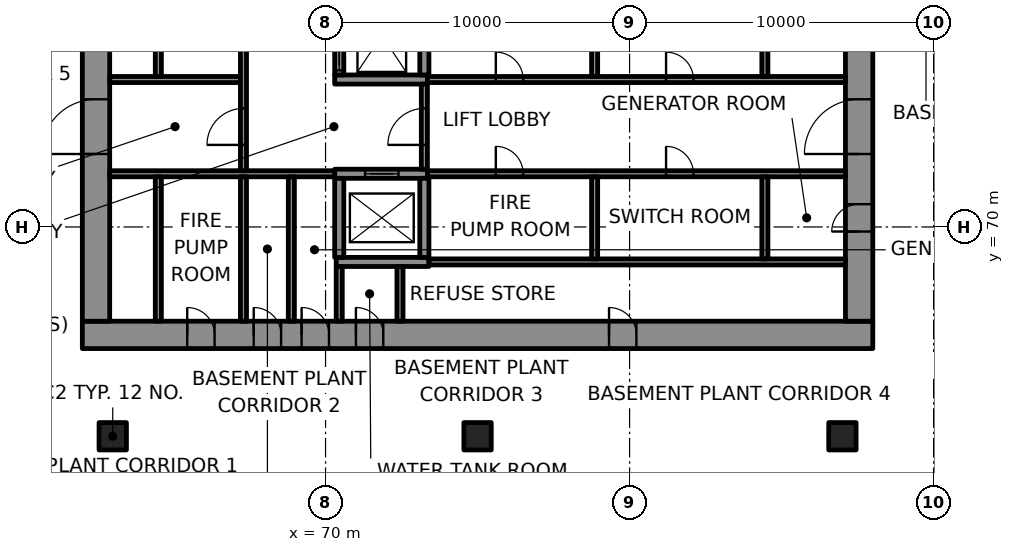
"""IFC4 building model, lengths in metres.
Left out: names, types, materials, properties, quantities, classifications, styles, units other than length and angle.
Written with IfcOpenShell. Run it as: python <this file> out.ifc"""

import sys

from ifc_helpers import new_model, si_unit, direction, frame, frame_2d, origin, origin_2d, place, context, subcontext, project, spatial, polyline, rectangle, outline, extrude, element, fill, save


model = new_model("IFC4")
c1 = context("Model", 3, precision=1e-05, world=origin(), true_north=direction((0.0, 1.0)))
c2 = subcontext(c1, "Body", "Model", "MODEL_VIEW")
j1 = project(units=[si_unit("LENGTHUNIT", "METRE"), si_unit("PLANEANGLEUNIT", "RADIAN")], contexts=[c1])
p1 = place(None, origin())
s1 = spatial("IfcSite", under=j1, at=p1, CompositionType="ELEMENT")
p2 = place(p1, origin())
s2 = spatial("IfcBuilding", under=s1, at=p2, CompositionType="ELEMENT")
p3 = place(p2, frame((0.0, 0.0, -14.0)))
s3 = spatial("IfcBuildingStorey", under=s2, at=p3, CompositionType="ELEMENT", Elevation=-14.0)
p4 = place(p3, frame((109.132, 57.451, -0.35), z_axis=(0.0, 0.0, 1.0), x_axis=(-0.499999206999, 0.866025861623, 0.0)))
e1 = element("IfcWall", 1, at=p4, inside=s3, PredefinedType="SOLIDWALL", context=c2, shape_type="SweptSolid", body=[
    extrude(rectangle(XDim=61.064, YDim=0.6, at=frame_2d((30.532, 0.0))), origin(), (0.0, 0.0, 1.0), 4.5),
])
p5 = place(p3, frame((67.936, 110.334, -0.35), z_axis=(0.0, 0.0, 1.0), x_axis=(-0.499999089162, -0.866025929656, 0.0)))
e2 = element("IfcWall", 2, at=p5, inside=s3, PredefinedType="SOLIDWALL", context=c2, shape_type="SweptSolid", body=[
    extrude(rectangle(XDim=53.501, YDim=0.6, at=frame_2d((26.751, 0.0))), origin(), (0.0, 0.0, 1.0), 4.5),
])
p6 = place(p3, frame((0.0, 0.0, -14.5)))
e3 = element("IfcWall", 3, at=p6, inside=s3, PredefinedType="SOLIDWALL", context=c2, shape_type="SweptSolid", body=[
    extrude(outline(polyline([(109.132, 57.451), (78.6, 110.334), (79.062, 111.134), (110.056, 57.451), (109.132, 57.451)])), origin(), (0.0, 0.0, 1.0), 14.15),
])
e4 = element("IfcWall", 4, at=p6, inside=s3, PredefinedType="SOLIDWALL", context=c2, shape_type="SweptSolid", body=[
    extrude(outline(polyline([(67.936, 110.334), (41.185, 64.0), (40.723, 64.8), (67.474, 111.134), (67.936, 110.334)])), origin(), (0.0, 0.0, 1.0), 14.15),
])
for number, where, z_axis, x_axis in (
    (5, (63.0, 63.115, -0.35), (0.0, 0.0, 1.0), (1.0, 0.0, 0.0)),
    (6, (75.0, 63.115, -0.35), (0.0, 0.0, 1.0), (1.0, 0.0, 0.0)),
    (7, (87.0, 63.115, -0.35), (0.0, 0.0, 1.0), (1.0, 0.0, 0.0)),
):
    element("IfcColumn", number, at=place(p3, frame(where, z_axis=z_axis, x_axis=x_axis)), inside=s3, PredefinedType="COLUMN", context=c2, shape_type="SweptSolid", body=[
        extrude(rectangle(XDim=0.9, YDim=0.9, at=origin_2d()), origin(), (0.0, 0.0, 1.0), 4.85),
    ])
p7 = place(p3, frame((62.0, 66.45, -0.35), z_axis=(0.0, 0.0, 1.0), x_axis=(1.0, 0.0, 0.0)))
e8 = element("IfcWall", 8, at=p7, inside=s3, PredefinedType="SHEAR", context=c2, shape_type="SweptSolid", body=[
    extrude(rectangle(XDim=26.0, YDim=0.9, at=frame_2d((13.0, 0.0))), origin(), (0.0, 0.0, 1.0), 4.5),
])
p8 = place(p7, frame((3.45, 0.0, 0.35)))
e9 = element("IfcOpeningElement", 9, at=p8, cuts=e8, PredefinedType="OPENING", context=c2, shape_type="SweptSolid", body=[
    extrude(rectangle(XDim=0.9, YDim=2.1, at=frame_2d((0.45, 1.05))), frame((0.0, 0.46, 0.0), z_axis=(0.0, -1.0, 0.0), x_axis=(1.0, 0.0, 0.0)), (0.0, 0.0, 1.0), 0.92),
])
p9 = place(p7, frame((5.637, 0.0, 0.35)))
e10 = element("IfcOpeningElement", 10, at=p9, cuts=e8, PredefinedType="OPENING", context=c2, shape_type="SweptSolid", body=[
    extrude(rectangle(XDim=0.9, YDim=2.1, at=frame_2d((0.45, 1.05))), frame((0.0, 0.46, 0.0), z_axis=(0.0, -1.0, 0.0), x_axis=(1.0, 0.0, 0.0)), (0.0, 0.0, 1.0), 0.92),
])
p10 = place(p7, frame((7.212, 0.0, 0.35)))
e11 = element("IfcOpeningElement", 11, at=p10, cuts=e8, PredefinedType="OPENING", context=c2, shape_type="SweptSolid", body=[
    extrude(rectangle(XDim=0.9, YDim=2.1, at=frame_2d((0.45, 1.05))), frame((0.0, 0.46, 0.0), z_axis=(0.0, -1.0, 0.0), x_axis=(1.0, 0.0, 0.0)), (0.0, 0.0, 1.0), 0.92),
])
p11 = place(p7, frame((8.999, 0.0, 0.35)))
e12 = element("IfcOpeningElement", 12, at=p11, cuts=e8, PredefinedType="OPENING", context=c2, shape_type="SweptSolid", body=[
    extrude(rectangle(XDim=0.9, YDim=2.1, at=frame_2d((0.45, 1.05))), frame((0.0, 0.46, 0.0), z_axis=(0.0, -1.0, 0.0), x_axis=(1.0, 0.0, 0.0)), (0.0, 0.0, 1.0), 0.92),
])
p12 = place(p7, frame((17.324, 0.0, 0.35)))
e13 = element("IfcOpeningElement", 13, at=p12, cuts=e8, PredefinedType="OPENING", context=c2, shape_type="SweptSolid", body=[
    extrude(rectangle(XDim=0.9, YDim=2.1, at=frame_2d((0.45, 1.05))), frame((0.0, 0.46, 0.0), z_axis=(0.0, -1.0, 0.0), x_axis=(1.0, 0.0, 0.0)), (0.0, 0.0, 1.0), 0.92),
])
p13 = place(p3, frame((62.45, 66.9, -0.35), z_axis=(0.0, 0.0, 1.0), x_axis=(0.0, 1.0, 0.0)))
e14 = element("IfcWall", 14, at=p13, inside=s3, PredefinedType="SHEAR", context=c2, shape_type="SweptSolid", body=[
    extrude(rectangle(XDim=16.2, YDim=0.9, at=frame_2d((8.1, 0.0))), origin(), (0.0, 0.0, 1.0), 4.5),
])
p14 = place(p13, frame((5.5, 0.0, 0.35)))
e15 = element("IfcOpeningElement", 15, at=p14, cuts=e14, PredefinedType="OPENING", context=c2, shape_type="SweptSolid", body=[
    extrude(rectangle(XDim=1.8, YDim=2.1, at=frame_2d((0.9, 1.05))), frame((0.0, 0.46, 0.0), z_axis=(0.0, -1.0, 0.0), x_axis=(1.0, 0.0, 0.0)), (0.0, 0.0, 1.0), 0.92),
])
p15 = place(p3, frame((87.55, 66.9, -0.35), z_axis=(0.0, 0.0, 1.0), x_axis=(0.0, 1.0, 0.0)))
e16 = element("IfcWall", 16, at=p15, inside=s3, PredefinedType="SHEAR", context=c2, shape_type="SweptSolid", body=[
    extrude(rectangle(XDim=16.2, YDim=0.9, at=frame_2d((8.1, 0.0))), origin(), (0.0, 0.0, 1.0), 4.5),
])
p16 = place(p15, frame((5.5, 0.0, 0.35)))
e17 = element("IfcOpeningElement", 17, at=p16, cuts=e16, PredefinedType="OPENING", context=c2, shape_type="SweptSolid", body=[
    extrude(rectangle(XDim=1.8, YDim=2.1, at=frame_2d((0.9, 1.05))), frame((0.0, 0.46, 0.0), z_axis=(0.0, -1.0, 0.0), x_axis=(1.0, 0.0, 0.0)), (0.0, 0.0, 1.0), 0.92),
])
p17 = place(p15, frame((2.95, 0.0, 0.35)))
e18 = element("IfcOpeningElement", 18, at=p17, cuts=e16, PredefinedType="OPENING", context=c2, shape_type="SweptSolid", body=[
    extrude(rectangle(XDim=0.9, YDim=2.1, at=frame_2d((0.45, 1.05))), frame((0.0, 0.46, 0.0), z_axis=(0.0, -1.0, 0.0), x_axis=(1.0, 0.0, 0.0)), (0.0, 0.0, 1.0), 0.92),
])
p18 = place(p15, frame((8.95, 0.0, 0.35)))
e19 = element("IfcOpeningElement", 19, at=p18, cuts=e16, PredefinedType="OPENING", context=c2, shape_type="SweptSolid", body=[
    extrude(rectangle(XDim=0.9, YDim=2.1, at=frame_2d((0.45, 1.05))), frame((0.0, 0.46, 0.0), z_axis=(0.0, -1.0, 0.0), x_axis=(1.0, 0.0, 0.0)), (0.0, 0.0, 1.0), 0.92),
])
p19 = place(p15, frame((11.202, 0.0, 0.35)))
e20 = element("IfcOpeningElement", 20, at=p19, cuts=e16, PredefinedType="OPENING", context=c2, shape_type="SweptSolid", body=[
    extrude(rectangle(XDim=0.9, YDim=2.1, at=frame_2d((0.45, 1.05))), frame((0.0, 0.46, 0.0), z_axis=(0.0, -1.0, 0.0), x_axis=(1.0, 0.0, 0.0)), (0.0, 0.0, 1.0), 0.92),
])
p20 = place(p3, frame((70.35, 68.85, -0.35), z_axis=(0.0, 0.0, 1.0), x_axis=(1.0, 0.0, 0.0)))
e21 = element("IfcWall", 21, at=p20, inside=s3, PredefinedType="SHEAR", context=c2, shape_type="SweptSolid", body=[
    extrude(rectangle(XDim=3.05, YDim=0.3, at=frame_2d((1.525, 0.0))), origin(), (0.0, 0.0, 1.0), 4.5),
])
p21 = place(p3, frame((70.3, 71.75, -0.35), z_axis=(0.0, 0.0, 1.0), x_axis=(1.0, 0.0, 0.0)))
e22 = element("IfcWall", 22, at=p21, inside=s3, PredefinedType="SHEAR", context=c2, shape_type="SweptSolid", body=[
    extrude(rectangle(XDim=3.05, YDim=0.3, at=frame_2d((1.525, 0.0))), origin(), (0.0, 0.0, 1.0), 4.5),
])
p22 = place(p21, frame((1.0, 0.0, 0.35)))
e23 = element("IfcOpeningElement", 23, at=p22, cuts=e22, PredefinedType="OPENING", context=c2, shape_type="SweptSolid", body=[
    extrude(rectangle(XDim=1.1, YDim=2.1, at=frame_2d((0.55, 1.05))), frame((0.0, 0.16, 0.0), z_axis=(0.0, -1.0, 0.0), x_axis=(1.0, 0.0, 0.0)), (0.0, 0.0, 1.0), 0.32),
])
p23 = place(p3, frame((70.3, 74.85, -0.35), z_axis=(0.0, 0.0, 1.0), x_axis=(1.0, 0.0, 0.0)))
e24 = element("IfcWall", 24, at=p23, inside=s3, PredefinedType="SHEAR", context=c2, shape_type="SweptSolid", body=[
    extrude(rectangle(XDim=3.05, YDim=0.3, at=frame_2d((1.525, 0.0))), origin(), (0.0, 0.0, 1.0), 4.5),
])
p24 = place(p3, frame((70.45, 69.0, -0.35), z_axis=(0.0, 0.0, 1.0), x_axis=(0.0, 1.0, 0.0)))
e25 = element("IfcWall", 25, at=p24, inside=s3, PredefinedType="SHEAR", context=c2, shape_type="SweptSolid", body=[
    extrude(rectangle(XDim=2.6, YDim=0.3, at=frame_2d((1.3, 0.0))), origin(), (0.0, 0.0, 1.0), 4.5),
])
p25 = place(p3, frame((70.45, 75.0, -0.35), z_axis=(0.0, 0.0, 1.0), x_axis=(0.0, 1.0, 0.0)))
e26 = element("IfcWall", 26, at=p25, inside=s3, PredefinedType="SHEAR", context=c2, shape_type="SweptSolid", body=[
    extrude(rectangle(XDim=2.6, YDim=0.3, at=frame_2d((1.3, 0.0))), origin(), (0.0, 0.0, 1.0), 4.5),
])
p26 = place(p25, frame((0.15, 0.0, 0.35)))
e27 = element("IfcOpeningElement", 27, at=p26, cuts=e26, PredefinedType="OPENING", context=c2, shape_type="SweptSolid", body=[
    extrude(rectangle(XDim=1.1, YDim=2.1, at=frame_2d((0.55, 1.05))), frame((0.0, 0.16, 0.0), z_axis=(0.0, -1.0, 0.0), x_axis=(1.0, 0.0, 0.0)), (0.0, 0.0, 1.0), 0.32),
])
for number, where, z_axis, x_axis in (
    (28, (73.25, 69.0, -0.35), (0.0, 0.0, 1.0), (0.0, 1.0, 0.0)),
    (29, (73.25, 75.0, -0.35), (0.0, 0.0, 1.0), (0.0, 1.0, 0.0)),
):
    element("IfcWall", number, at=place(p3, frame(where, z_axis=z_axis, x_axis=x_axis)), inside=s3, PredefinedType="SHEAR", context=c2, shape_type="SweptSolid", body=[
        extrude(rectangle(XDim=2.6, YDim=0.3, at=frame_2d((1.3, 0.0))), origin(), (0.0, 0.0, 1.0), 4.5),
    ])
p27 = place(p3, frame((73.4, 68.85, 0.0), z_axis=(0.0, 0.0, 1.0), x_axis=(1.0, 0.0, 0.0)))
e30 = element("IfcWall", 30, at=p27, inside=s3, PredefinedType="PARTITIONING", context=c2, shape_type="SweptSolid", body=[
    extrude(rectangle(XDim=13.7, YDim=0.2, at=frame_2d((6.85, 0.0))), origin(), (0.0, 0.0, 1.0), 4.15),
])
p28 = place(p3, frame((62.9, 71.75, 0.0), z_axis=(0.0, 0.0, 1.0), x_axis=(1.0, 0.0, 0.0)))
e31 = element("IfcWall", 31, at=p28, inside=s3, PredefinedType="PARTITIONING", context=c2, shape_type="SweptSolid", body=[
    extrude(rectangle(XDim=7.4, YDim=0.2, at=frame_2d((3.7, 0.0))), origin(), (0.0, 0.0, 1.0), 4.15),
])
p29 = place(p3, frame((73.35, 71.75, 0.0), z_axis=(0.0, 0.0, 1.0), x_axis=(1.0, 0.0, 0.0)))
e32 = element("IfcWall", 32, at=p29, inside=s3, PredefinedType="PARTITIONING", context=c2, shape_type="SweptSolid", body=[
    extrude(rectangle(XDim=13.75, YDim=0.2, at=frame_2d((6.875, 0.0))), origin(), (0.0, 0.0, 1.0), 4.15),
])
p30 = place(p29, frame((2.25, 0.0, 0.0)))
e33 = element("IfcOpeningElement", 33, at=p30, cuts=e32, PredefinedType="OPENING", context=c2, shape_type="SweptSolid", body=[
    extrude(rectangle(XDim=0.9, YDim=2.1, at=frame_2d((0.45, 1.05))), frame((0.0, 0.11, 0.0), z_axis=(0.0, -1.0, 0.0), x_axis=(1.0, 0.0, 0.0)), (0.0, 0.0, 1.0), 0.22),
])
p31 = place(p29, frame((7.85, 0.0, 0.0)))
e34 = element("IfcOpeningElement", 34, at=p31, cuts=e32, PredefinedType="OPENING", context=c2, shape_type="SweptSolid", body=[
    extrude(rectangle(XDim=0.9, YDim=2.1, at=frame_2d((0.45, 1.05))), frame((0.0, 0.11, 0.0), z_axis=(0.0, -1.0, 0.0), x_axis=(1.0, 0.0, 0.0)), (0.0, 0.0, 1.0), 0.22),
])
p32 = place(p3, frame((62.9, 74.85, 0.0), z_axis=(0.0, 0.0, 1.0), x_axis=(1.0, 0.0, 0.0)))
e35 = element("IfcWall", 35, at=p32, inside=s3, PredefinedType="PARTITIONING", context=c2, shape_type="SweptSolid", body=[
    extrude(rectangle(XDim=4.3, YDim=0.2, at=frame_2d((2.15, 0.0))), origin(), (0.0, 0.0, 1.0), 4.15),
])
p33 = place(p3, frame((73.35, 74.85, 0.0), z_axis=(0.0, 0.0, 1.0), x_axis=(1.0, 0.0, 0.0)))
e36 = element("IfcWall", 36, at=p33, inside=s3, PredefinedType="PARTITIONING", context=c2, shape_type="SweptSolid", body=[
    extrude(rectangle(XDim=13.75, YDim=0.2, at=frame_2d((6.875, 0.0))), origin(), (0.0, 0.0, 1.0), 4.15),
])
p34 = place(p33, frame((2.25, 0.0, 0.0)))
e37 = element("IfcOpeningElement", 37, at=p34, cuts=e36, PredefinedType="OPENING", context=c2, shape_type="SweptSolid", body=[
    extrude(rectangle(XDim=0.9, YDim=2.1, at=frame_2d((0.45, 1.05))), frame((0.0, 0.11, 0.0), z_axis=(0.0, -1.0, 0.0), x_axis=(1.0, 0.0, 0.0)), (0.0, 0.0, 1.0), 0.22),
])
p35 = place(p33, frame((7.85, 0.0, 0.0)))
e38 = element("IfcOpeningElement", 38, at=p35, cuts=e36, PredefinedType="OPENING", context=c2, shape_type="SweptSolid", body=[
    extrude(rectangle(XDim=0.9, YDim=2.1, at=frame_2d((0.45, 1.05))), frame((0.0, 0.11, 0.0), z_axis=(0.0, -1.0, 0.0), x_axis=(1.0, 0.0, 0.0)), (0.0, 0.0, 1.0), 0.22),
])
p36 = place(p3, frame((64.5, 66.9, 0.0), z_axis=(0.0, 0.0, 1.0), x_axis=(0.0, 1.0, 0.0)))
e39 = element("IfcWall", 39, at=p36, inside=s3, PredefinedType="PARTITIONING", context=c2, shape_type="SweptSolid", body=[
    extrude(rectangle(XDim=4.75, YDim=0.2, at=frame_2d((2.375, 0.0))), origin(), (0.0, 0.0, 1.0), 4.15),
])
p37 = place(p3, frame((64.5, 74.95, 0.0), z_axis=(0.0, 0.0, 1.0), x_axis=(0.0, 1.0, 0.0)))
e40 = element("IfcWall", 40, at=p37, inside=s3, PredefinedType="PARTITIONING", context=c2, shape_type="SweptSolid", body=[
    extrude(rectangle(XDim=8.15, YDim=0.2, at=frame_2d((4.075, 0.0))), origin(), (0.0, 0.0, 1.0), 4.15),
])
p38 = place(p3, frame((67.3, 66.9, 0.0), z_axis=(0.0, 0.0, 1.0), x_axis=(0.0, 1.0, 0.0)))
e41 = element("IfcWall", 41, at=p38, inside=s3, PredefinedType="PARTITIONING", context=c2, shape_type="SweptSolid", body=[
    extrude(rectangle(XDim=4.75, YDim=0.2, at=frame_2d((2.375, 0.0))), origin(), (0.0, 0.0, 1.0), 4.15),
])
p39 = place(p3, frame((67.3, 71.85, 0.0), z_axis=(0.0, 0.0, 1.0), x_axis=(0.0, 1.0, 0.0)))
e42 = element("IfcWall", 42, at=p39, inside=s3, PredefinedType="PARTITIONING", context=c2, shape_type="SweptSolid", body=[
    extrude(rectangle(XDim=5.75, YDim=0.2, at=frame_2d((2.875, 0.0))), origin(), (0.0, 0.0, 1.0), 4.15),
])
p40 = place(p39, frame((0.85, 0.0, 0.0)))
e43 = element("IfcOpeningElement", 43, at=p40, cuts=e42, PredefinedType="OPENING", context=c2, shape_type="SweptSolid", body=[
    extrude(rectangle(XDim=1.2, YDim=2.1, at=frame_2d((0.6, 1.05))), frame((0.0, 0.11, 0.0), z_axis=(0.0, -1.0, 0.0), x_axis=(1.0, 0.0, 0.0)), (0.0, 0.0, 1.0), 0.22),
])
p41 = place(p3, frame((68.875, 66.9, 0.0), z_axis=(0.0, 0.0, 1.0), x_axis=(0.0, 1.0, 0.0)))
e44 = element("IfcWall", 44, at=p41, inside=s3, PredefinedType="PARTITIONING", context=c2, shape_type="SweptSolid", body=[
    extrude(rectangle(XDim=4.75, YDim=0.2, at=frame_2d((2.375, 0.0))), origin(), (0.0, 0.0, 1.0), 4.15),
])
for number, where, z_axis, x_axis in (
    (45, (70.45, 66.9, 0.0), (0.0, 0.0, 1.0), (0.0, 1.0, 0.0)),
    (46, (72.448, 66.9, 0.0), (0.0, 0.0, 1.0), (0.0, 1.0, 0.0)),
):
    element("IfcWall", number, at=place(p3, frame(where, z_axis=z_axis, x_axis=x_axis)), inside=s3, PredefinedType="PARTITIONING", context=c2, shape_type="SweptSolid", body=[
        extrude(rectangle(XDim=1.8, YDim=0.2, at=frame_2d((0.9, 0.0))), origin(), (0.0, 0.0, 1.0), 4.15),
    ])
p42 = place(p3, frame((73.25, 71.9, 0.0), z_axis=(0.0, 0.0, 1.0), x_axis=(0.0, 1.0, 0.0)))
e47 = element("IfcWall", 47, at=p42, inside=s3, PredefinedType="PARTITIONING", context=c2, shape_type="SweptSolid", body=[
    extrude(rectangle(XDim=2.8, YDim=0.2, at=frame_2d((1.4, 0.0))), origin(), (0.0, 0.0, 1.0), 4.15),
])
p43 = place(p42, frame((0.8, 0.0, 0.0)))
e48 = element("IfcOpeningElement", 48, at=p43, cuts=e47, PredefinedType="OPENING", context=c2, shape_type="SweptSolid", body=[
    extrude(rectangle(XDim=1.2, YDim=2.1, at=frame_2d((0.6, 1.05))), frame((0.0, 0.11, 0.0), z_axis=(0.0, -1.0, 0.0), x_axis=(1.0, 0.0, 0.0)), (0.0, 0.0, 1.0), 0.22),
])
p44 = place(p3, frame((78.85, 68.95, 0.0), z_axis=(0.0, 0.0, 1.0), x_axis=(0.0, 1.0, 0.0)))
e49 = element("IfcWall", 49, at=p44, inside=s3, PredefinedType="PARTITIONING", context=c2, shape_type="SweptSolid", body=[
    extrude(rectangle(XDim=2.7, YDim=0.2, at=frame_2d((1.35, 0.0))), origin(), (0.0, 0.0, 1.0), 4.15),
])
p45 = place(p3, frame((78.85, 74.95, 0.0), z_axis=(0.0, 0.0, 1.0), x_axis=(0.0, 1.0, 0.0)))
e50 = element("IfcWall", 50, at=p45, inside=s3, PredefinedType="PARTITIONING", context=c2, shape_type="SweptSolid", body=[
    extrude(rectangle(XDim=2.65, YDim=0.2, at=frame_2d((1.325, 0.0))), origin(), (0.0, 0.0, 1.0), 4.15),
])
for number, where, z_axis, x_axis in (
    (51, (84.45, 68.95, 0.0), (0.0, 0.0, 1.0), (0.0, 1.0, 0.0)),
    (52, (84.45, 74.95, 0.0), (0.0, 0.0, 1.0), (0.0, 1.0, 0.0)),
):
    element("IfcWall", number, at=place(p3, frame(where, z_axis=z_axis, x_axis=x_axis)), inside=s3, PredefinedType="PARTITIONING", context=c2, shape_type="SweptSolid", body=[
        extrude(rectangle(XDim=2.7, YDim=0.2, at=frame_2d((1.35, 0.0))), origin(), (0.0, 0.0, 1.0), 4.15),
    ])
p46 = place(p22, origin())
e53 = element("IfcDoor", 53, at=p46, inside=s3, OperationType="DOUBLE_DOOR_SLIDING", PredefinedType="DOOR", context=c2, shape_type="SweptSolid", body=[
    extrude(rectangle(XDim=1.1, YDim=2.1, at=frame_2d((0.55, 1.05))), frame((0.0, 0.025, 0.0), z_axis=(0.0, -1.0, 0.0), x_axis=(1.0, 0.0, 0.0)), (0.0, 0.0, 1.0), 0.05),
])
fill(e23, e53)
p47 = place(p26, origin())
e54 = element("IfcDoor", 54, at=p47, inside=s3, OperationType="DOUBLE_DOOR_SLIDING", PredefinedType="DOOR", context=c2, shape_type="SweptSolid", body=[
    extrude(rectangle(XDim=1.1, YDim=2.1, at=frame_2d((0.55, 1.05))), frame((0.0, 0.025, 0.0), z_axis=(0.0, -1.0, 0.0), x_axis=(1.0, 0.0, 0.0)), (0.0, 0.0, 1.0), 0.05),
])
fill(e27, e54)
p48 = place(p43, origin())
e55 = element("IfcDoor", 55, at=p48, inside=s3, OperationType="SINGLE_SWING_LEFT", PredefinedType="DOOR", context=c2, shape_type="SweptSolid", body=[
    extrude(rectangle(XDim=1.2, YDim=2.1, at=frame_2d((0.6, 1.05))), frame((0.0, 0.025, 0.0), z_axis=(0.0, -1.0, 0.0), x_axis=(1.0, 0.0, 0.0)), (0.0, 0.0, 1.0), 0.05),
])
fill(e48, e55)
p49 = place(p40, origin())
e56 = element("IfcDoor", 56, at=p49, inside=s3, OperationType="SINGLE_SWING_RIGHT", PredefinedType="DOOR", context=c2, shape_type="SweptSolid", body=[
    extrude(rectangle(XDim=1.2, YDim=2.1, at=frame_2d((0.6, 1.05))), frame((0.0, 0.025, 0.0), z_axis=(0.0, -1.0, 0.0), x_axis=(1.0, 0.0, 0.0)), (0.0, 0.0, 1.0), 0.05),
])
fill(e43, e56)
p50 = place(p14, origin())
e57 = element("IfcDoor", 57, at=p50, inside=s3, OperationType="SINGLE_SWING_LEFT", PredefinedType="DOOR", context=c2, shape_type="SweptSolid", body=[
    extrude(rectangle(XDim=1.8, YDim=2.1, at=frame_2d((0.9, 1.05))), frame((0.0, 0.17, 0.0), z_axis=(0.0, -1.0, 0.0), x_axis=(1.0, 0.0, 0.0)), (0.0, 0.0, 1.0), 0.34),
])
fill(e15, e57)
p51 = place(p16, origin())
e58 = element("IfcDoor", 58, at=p51, inside=s3, OperationType="SINGLE_SWING_RIGHT", PredefinedType="DOOR", context=c2, shape_type="SweptSolid", body=[
    extrude(rectangle(XDim=1.8, YDim=2.1, at=frame_2d((0.9, 1.05))), frame((0.0, 0.17, 0.0), z_axis=(0.0, -1.0, 0.0), x_axis=(1.0, 0.0, 0.0)), (0.0, 0.0, 1.0), 0.34),
])
fill(e17, e58)
p52 = place(p8, origin())
e59 = element("IfcDoor", 59, at=p52, inside=s3, OperationType="SINGLE_SWING_LEFT", PredefinedType="DOOR", context=c2, shape_type="SweptSolid", body=[
    extrude(rectangle(XDim=0.9, YDim=2.1, at=frame_2d((0.45, 1.05))), frame((0.0, 0.17, 0.0), z_axis=(0.0, -1.0, 0.0), x_axis=(1.0, 0.0, 0.0)), (0.0, 0.0, 1.0), 0.34),
])
fill(e9, e59)
p53 = place(p9, origin())
e60 = element("IfcDoor", 60, at=p53, inside=s3, OperationType="SINGLE_SWING_RIGHT", PredefinedType="DOOR", context=c2, shape_type="SweptSolid", body=[
    extrude(rectangle(XDim=0.9, YDim=2.1, at=frame_2d((0.45, 1.05))), frame((0.0, 0.17, 0.0), z_axis=(0.0, -1.0, 0.0), x_axis=(1.0, 0.0, 0.0)), (0.0, 0.0, 1.0), 0.34),
])
fill(e10, e60)
p54 = place(p10, origin())
e61 = element("IfcDoor", 61, at=p54, inside=s3, OperationType="SINGLE_SWING_LEFT", PredefinedType="DOOR", context=c2, shape_type="SweptSolid", body=[
    extrude(rectangle(XDim=0.9, YDim=2.1, at=frame_2d((0.45, 1.05))), frame((0.0, 0.17, 0.0), z_axis=(0.0, -1.0, 0.0), x_axis=(1.0, 0.0, 0.0)), (0.0, 0.0, 1.0), 0.34),
])
fill(e11, e61)
p55 = place(p30, origin())
e62 = element("IfcDoor", 62, at=p55, inside=s3, OperationType="SINGLE_SWING_RIGHT", PredefinedType="DOOR", context=c2, shape_type="SweptSolid", body=[
    extrude(rectangle(XDim=0.9, YDim=2.1, at=frame_2d((0.45, 1.05))), frame((0.0, 0.025, 0.0), z_axis=(0.0, -1.0, 0.0), x_axis=(1.0, 0.0, 0.0)), (0.0, 0.0, 1.0), 0.05),
])
fill(e33, e62)
p56 = place(p31, origin())
e63 = element("IfcDoor", 63, at=p56, inside=s3, OperationType="SINGLE_SWING_LEFT", PredefinedType="DOOR", context=c2, shape_type="SweptSolid", body=[
    extrude(rectangle(XDim=0.9, YDim=2.1, at=frame_2d((0.45, 1.05))), frame((0.0, 0.025, 0.0), z_axis=(0.0, -1.0, 0.0), x_axis=(1.0, 0.0, 0.0)), (0.0, 0.0, 1.0), 0.05),
])
fill(e34, e63)
p57 = place(p17, origin())
e64 = element("IfcDoor", 64, at=p57, inside=s3, OperationType="SINGLE_SWING_RIGHT", PredefinedType="DOOR", context=c2, shape_type="SweptSolid", body=[
    extrude(rectangle(XDim=0.9, YDim=2.1, at=frame_2d((0.45, 1.05))), frame((0.0, 0.17, 0.0), z_axis=(0.0, -1.0, 0.0), x_axis=(1.0, 0.0, 0.0)), (0.0, 0.0, 1.0), 0.34),
])
fill(e18, e64)
p58 = place(p11, origin())
e65 = element("IfcDoor", 65, at=p58, inside=s3, OperationType="SINGLE_SWING_LEFT", PredefinedType="DOOR", context=c2, shape_type="SweptSolid", body=[
    extrude(rectangle(XDim=0.9, YDim=2.1, at=frame_2d((0.45, 1.05))), frame((0.0, 0.17, 0.0), z_axis=(0.0, -1.0, 0.0), x_axis=(1.0, 0.0, 0.0)), (0.0, 0.0, 1.0), 0.34),
])
fill(e12, e65)
p59 = place(p12, origin())
e66 = element("IfcDoor", 66, at=p59, inside=s3, OperationType="SINGLE_SWING_RIGHT", PredefinedType="DOOR", context=c2, shape_type="SweptSolid", body=[
    extrude(rectangle(XDim=0.9, YDim=2.1, at=frame_2d((0.45, 1.05))), frame((0.0, 0.17, 0.0), z_axis=(0.0, -1.0, 0.0), x_axis=(1.0, 0.0, 0.0)), (0.0, 0.0, 1.0), 0.34),
])
fill(e13, e66)
p60 = place(p34, origin())
e67 = element("IfcDoor", 67, at=p60, inside=s3, OperationType="SINGLE_SWING_RIGHT", PredefinedType="DOOR", context=c2, shape_type="SweptSolid", body=[
    extrude(rectangle(XDim=0.9, YDim=2.1, at=frame_2d((0.45, 1.05))), frame((0.0, 0.025, 0.0), z_axis=(0.0, -1.0, 0.0), x_axis=(1.0, 0.0, 0.0)), (0.0, 0.0, 1.0), 0.05),
])
fill(e37, e67)
p61 = place(p35, origin())
e68 = element("IfcDoor", 68, at=p61, inside=s3, OperationType="SINGLE_SWING_LEFT", PredefinedType="DOOR", context=c2, shape_type="SweptSolid", body=[
    extrude(rectangle(XDim=0.9, YDim=2.1, at=frame_2d((0.45, 1.05))), frame((0.0, 0.025, 0.0), z_axis=(0.0, -1.0, 0.0), x_axis=(1.0, 0.0, 0.0)), (0.0, 0.0, 1.0), 0.05),
])
fill(e38, e68)
save(model, sys.argv[1])
